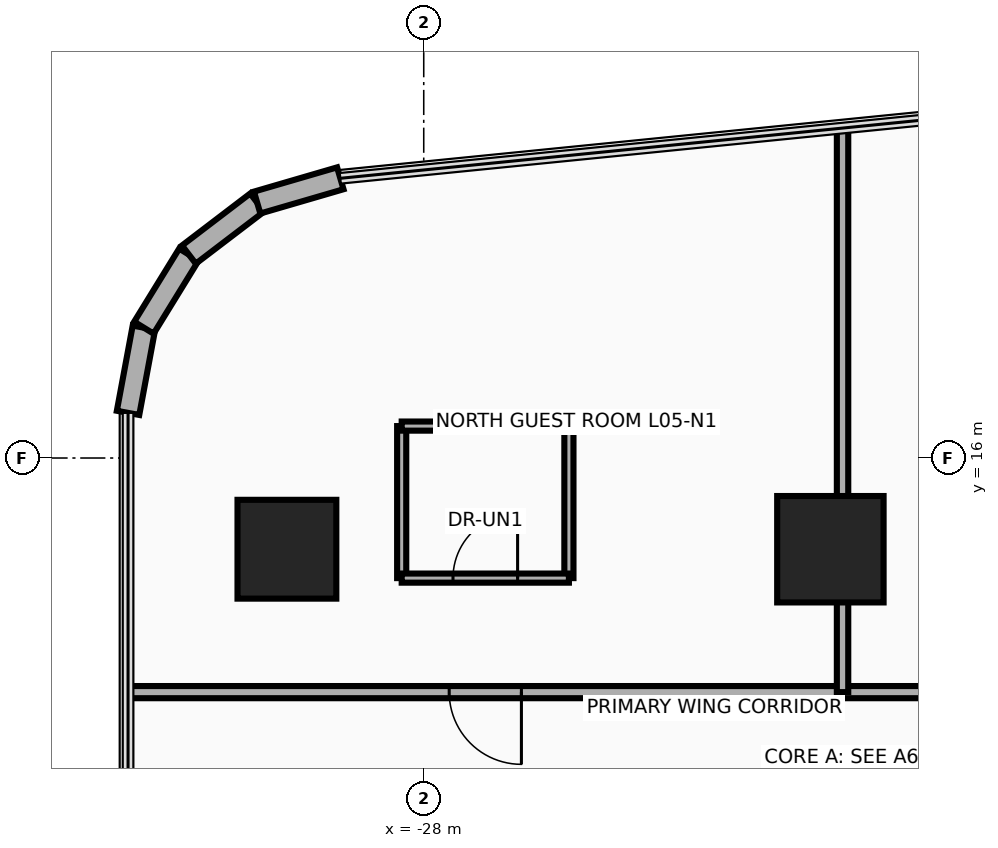
"""IFC4 building model, lengths in metres.
Left out: names, types, materials, properties, quantities, classifications, styles, units other than length and angle.
Written with IfcOpenShell. Run it as: python <this file> out.ifc"""

import sys

from ifc_helpers import new_model, si_unit, direction, frame, frame_2d, origin, origin_2d, place, context, subcontext, project, spatial, rectangle, circle, extrude, source, transform, mapped, element, fill, save


model = new_model("IFC4")
c1 = context("Model", 3, precision=1e-05, world=origin(), true_north=direction((0.0, 1.0)))
c2 = subcontext(c1, "Body", "Model", "MODEL_VIEW")
j1 = project(units=[si_unit("LENGTHUNIT", "METRE"), si_unit("PLANEANGLEUNIT", "RADIAN")], contexts=[c1])
p1 = place(None, origin())
s1 = spatial("IfcSite", under=j1, at=p1, CompositionType="ELEMENT")
p2 = place(p1, origin())
s2 = spatial("IfcBuilding", under=s1, at=p2, CompositionType="ELEMENT")
p3 = place(p2, frame((0.0, 0.0, 26.0)))
s3 = spatial("IfcBuildingStorey", under=s2, at=p3, CompositionType="ELEMENT", Elevation=26.0)
m1 = source(origin(), c2, "Body", "SweptSolid", [
    extrude(circle(Radius=0.65, at=origin_2d()), origin(), (0.0, 0.0, 1.0), 3.7),
])
p4 = place(p3, frame((-29.8, 14.8, 0.0), z_axis=(0.0, 0.0, 1.0), x_axis=(1.0, 0.0, 0.0)))
e1 = element("IfcColumn", 1, at=p4, inside=s3, PredefinedType="COLUMN", context=c2, shape_type="MappedRepresentation", body=[
    mapped(m1, transform((0.0, 0.0, 0.0), x_axis=(1.0, 0.0, 0.0), y_axis=(0.0, 1.0, 0.0), z_axis=(0.0, 0.0, 1.0), scale=1.0)),
])
m2 = source(origin(), c2, "Body", "SweptSolid", [
    extrude(rectangle(XDim=1.4, YDim=1.4, at=origin_2d()), origin(), (0.0, 0.0, 1.0), 3.7),
])
p5 = place(p3, frame((-22.65, 14.8, 0.0), z_axis=(0.0, 0.0, 1.0), x_axis=(1.0, 0.0, 0.0)))
e2 = element("IfcColumn", 2, at=p5, inside=s3, PredefinedType="COLUMN", context=c2, shape_type="MappedRepresentation", body=[
    mapped(m2, transform((0.0, 0.0, 0.0), x_axis=(1.0, 0.0, 0.0), y_axis=(0.0, 1.0, 0.0), z_axis=(0.0, 0.0, 1.0), scale=1.0)),
])
p6 = place(p3, frame((-31.89, 16.594, 0.0), z_axis=(0.0, 0.0, 1.0), x_axis=(0.182748995683, 0.9831596028, 0.0)))
e3 = element("IfcWall", 3, at=p6, inside=s3, PredefinedType="SOLIDWALL", context=c2, shape_type="SweptSolid", body=[
    extrude(rectangle(XDim=1.14, YDim=0.3, at=frame_2d((0.57, 0.0))), origin(), (0.0, 0.0, 1.0), 3.46),
])
p7 = place(p3, frame((-31.682, 17.714, 0.0), z_axis=(0.0, 0.0, 1.0), x_axis=(0.524157723014, 0.8516212077, 0.0)))
e4 = element("IfcWall", 4, at=p7, inside=s3, PredefinedType="SOLIDWALL", context=c2, shape_type="SweptSolid", body=[
    extrude(rectangle(XDim=1.129, YDim=0.3, at=frame_2d((0.565, 0.0))), origin(), (0.0, 0.0, 1.0), 3.46),
])
p8 = place(p3, frame((-31.09, 18.676, 0.0), z_axis=(0.0, 0.0, 1.0), x_axis=(0.795253002434, 0.606277710393, 0.0)))
e5 = element("IfcWall", 5, at=p8, inside=s3, PredefinedType="SOLIDWALL", context=c2, shape_type="SweptSolid", body=[
    extrude(rectangle(XDim=1.129, YDim=0.3, at=frame_2d((0.564, 0.0))), origin(), (0.0, 0.0, 1.0), 3.46),
])
p9 = place(p3, frame((-30.192, 19.361, 0.0), z_axis=(0.0, 0.0, 1.0), x_axis=(0.960071941549, 0.279753225271, 0.0)))
e6 = element("IfcWall", 6, at=p9, inside=s3, PredefinedType="SOLIDWALL", context=c2, shape_type="SweptSolid", body=[
    extrude(rectangle(XDim=1.14, YDim=0.3, at=frame_2d((0.57, 0.0))), origin(), (0.0, 0.0, 1.0), 3.46),
])
p10 = place(p3, frame((-31.89, 12.92, 0.0), z_axis=(0.0, 0.0, 1.0), x_axis=(1.0, 0.0, 0.0)))
e7 = element("IfcWall", 7, at=p10, inside=s3, PredefinedType="PARTITIONING", context=c2, shape_type="SweptSolid", body=[
    extrude(rectangle(XDim=45.44, YDim=0.16, at=frame_2d((22.72, 0.0))), origin(), (0.0, 0.0, 1.0), 2.583),
])
p11 = place(p10, frame((4.225, 0.0, 0.0)))
e8 = element("IfcOpeningElement", 8, at=p11, cuts=e7, PredefinedType="OPENING", context=c2, shape_type="SweptSolid", body=[
    extrude(rectangle(XDim=0.95, YDim=2.15, at=frame_2d((0.475, 1.075))), frame((0.0, 0.095, 0.0), z_axis=(0.0, -1.0, 0.0), x_axis=(1.0, 0.0, 0.0)), (0.0, 0.0, 1.0), 0.19),
])
p12 = place(p10, frame((13.43, 0.0, 0.0)))
e9 = element("IfcOpeningElement", 9, at=p12, cuts=e7, PredefinedType="OPENING", context=c2, shape_type="SweptSolid", body=[
    extrude(rectangle(XDim=0.95, YDim=2.15, at=frame_2d((0.475, 1.075))), frame((0.0, 0.095, 0.0), z_axis=(0.0, -1.0, 0.0), x_axis=(1.0, 0.0, 0.0)), (0.0, 0.0, 1.0), 0.19),
])
p13 = place(p10, frame((20.31, 0.0, 0.0)))
e10 = element("IfcOpeningElement", 10, at=p13, cuts=e7, PredefinedType="OPENING", context=c2, shape_type="SweptSolid", body=[
    extrude(rectangle(XDim=0.95, YDim=2.15, at=frame_2d((0.475, 1.075))), frame((0.0, 0.095, 0.0), z_axis=(0.0, -1.0, 0.0), x_axis=(1.0, 0.0, 0.0)), (0.0, 0.0, 1.0), 0.19),
])
p14 = place(p10, frame((25.517, 0.0, 0.0)))
e11 = element("IfcOpeningElement", 11, at=p14, cuts=e7, PredefinedType="OPENING", context=c2, shape_type="SweptSolid", body=[
    extrude(rectangle(XDim=0.95, YDim=2.15, at=frame_2d((0.475, 1.075))), frame((0.0, 0.095, 0.0), z_axis=(0.0, -1.0, 0.0), x_axis=(1.0, 0.0, 0.0)), (0.0, 0.0, 1.0), 0.19),
])
p15 = place(p10, frame((28.373, 0.0, 0.0)))
e12 = element("IfcOpeningElement", 12, at=p15, cuts=e7, PredefinedType="OPENING", context=c2, shape_type="SweptSolid", body=[
    extrude(rectangle(XDim=0.95, YDim=2.15, at=frame_2d((0.475, 1.075))), frame((0.0, 0.095, 0.0), z_axis=(0.0, -1.0, 0.0), x_axis=(1.0, 0.0, 0.0)), (0.0, 0.0, 1.0), 0.19),
])
p16 = place(p10, frame((34.527, 0.0, 0.0)))
e13 = element("IfcOpeningElement", 13, at=p16, cuts=e7, PredefinedType="OPENING", context=c2, shape_type="SweptSolid", body=[
    extrude(rectangle(XDim=0.95, YDim=2.15, at=frame_2d((0.475, 1.075))), frame((0.0, 0.095, 0.0), z_axis=(0.0, -1.0, 0.0), x_axis=(1.0, 0.0, 0.0)), (0.0, 0.0, 1.0), 0.19),
])
p17 = place(p10, frame((39.36, 0.0, 0.0)))
e14 = element("IfcOpeningElement", 14, at=p17, cuts=e7, PredefinedType="OPENING", context=c2, shape_type="SweptSolid", body=[
    extrude(rectangle(XDim=0.95, YDim=2.15, at=frame_2d((0.475, 1.075))), frame((0.0, 0.095, 0.0), z_axis=(0.0, -1.0, 0.0), x_axis=(1.0, 0.0, 0.0)), (0.0, 0.0, 1.0), 0.19),
])
p18 = place(p3, frame((-22.49, 12.92, 0.0), z_axis=(0.0, 0.0, 1.0), x_axis=(0.0, 1.0, 0.0)))
e15 = element("IfcWall", 15, at=p18, inside=s3, PredefinedType="PARTITIONING", context=c2, shape_type="SweptSolid", body=[
    extrude(rectangle(XDim=7.421, YDim=0.15, at=frame_2d((3.71, 0.0))), origin(), (0.0, 0.0, 1.0), 2.583),
])
for number, where, z_axis, x_axis in (
    (16, (-28.29, 14.42, 0.0), (0.0, 0.0, 1.0), (0.0, 1.0, 0.0)),
    (17, (-26.09, 14.42, 0.0), (0.0, 0.0, 1.0), (0.0, 1.0, 0.0)),
):
    element("IfcWall", number, at=place(p3, frame(where, z_axis=z_axis, x_axis=x_axis)), inside=s3, PredefinedType="PARTITIONING", context=c2, shape_type="SweptSolid", body=[
        extrude(rectangle(XDim=2.0, YDim=0.12, at=frame_2d((1.0, 0.0))), origin(), (0.0, 0.0, 1.0), 2.583),
    ])
p19 = place(p3, frame((-28.29, 16.42, 0.0), z_axis=(0.0, 0.0, 1.0), x_axis=(1.0, 0.0, 0.0)))
e18 = element("IfcWall", 18, at=p19, inside=s3, PredefinedType="PARTITIONING", context=c2, shape_type="SweptSolid", body=[
    extrude(rectangle(XDim=2.2, YDim=0.12, at=frame_2d((1.1, 0.0))), origin(), (0.0, 0.0, 1.0), 3.46),
])
p20 = place(p3, frame((-28.29, 14.42, 0.0), z_axis=(0.0, 0.0, 1.0), x_axis=(1.0, 0.0, 0.0)))
e19 = element("IfcWall", 19, at=p20, inside=s3, PredefinedType="PARTITIONING", context=c2, shape_type="SweptSolid", body=[
    extrude(rectangle(XDim=2.2, YDim=0.12, at=frame_2d((1.1, 0.0))), origin(), (0.0, 0.0, 1.0), 3.46),
])
p21 = place(p20, frame((0.675, 0.0, 0.0)))
e20 = element("IfcOpeningElement", 20, at=p21, cuts=e19, PredefinedType="OPENING", context=c2, shape_type="SweptSolid", body=[
    extrude(rectangle(XDim=0.85, YDim=2.1, at=frame_2d((0.425, 1.05))), frame((0.0, 0.075, 0.0), z_axis=(0.0, -1.0, 0.0), x_axis=(1.0, 0.0, 0.0)), (0.0, 0.0, 1.0), 0.15),
])
p22 = place(p11, frame((0.95, 0.0, 0.0), z_axis=(0.0, 0.0, 1.0), x_axis=(-1.0, 0.0, 0.0)))
e21 = element("IfcDoor", 21, at=p22, inside=s3, OperationType="SINGLE_SWING_LEFT", PredefinedType="DOOR", context=c2, shape_type="SweptSolid", body=[
    extrude(rectangle(XDim=0.95, YDim=2.15, at=frame_2d((0.475, 1.075))), frame((0.0, 0.025, 0.0), z_axis=(0.0, -1.0, 0.0), x_axis=(1.0, 0.0, 0.0)), (0.0, 0.0, 1.0), 0.05),
])
fill(e8, e21)
p23 = place(p21, origin())
e22 = element("IfcDoor", 22, at=p23, inside=s3, OperationType="SINGLE_SWING_RIGHT", PredefinedType="DOOR", context=c2, shape_type="SweptSolid", body=[
    extrude(rectangle(XDim=0.85, YDim=2.1, at=frame_2d((0.425, 1.05))), frame((0.0, 0.025, 0.0), z_axis=(0.0, -1.0, 0.0), x_axis=(1.0, 0.0, 0.0)), (0.0, 0.0, 1.0), 0.05),
])
fill(e20, e22)
save(model, sys.argv[1])
